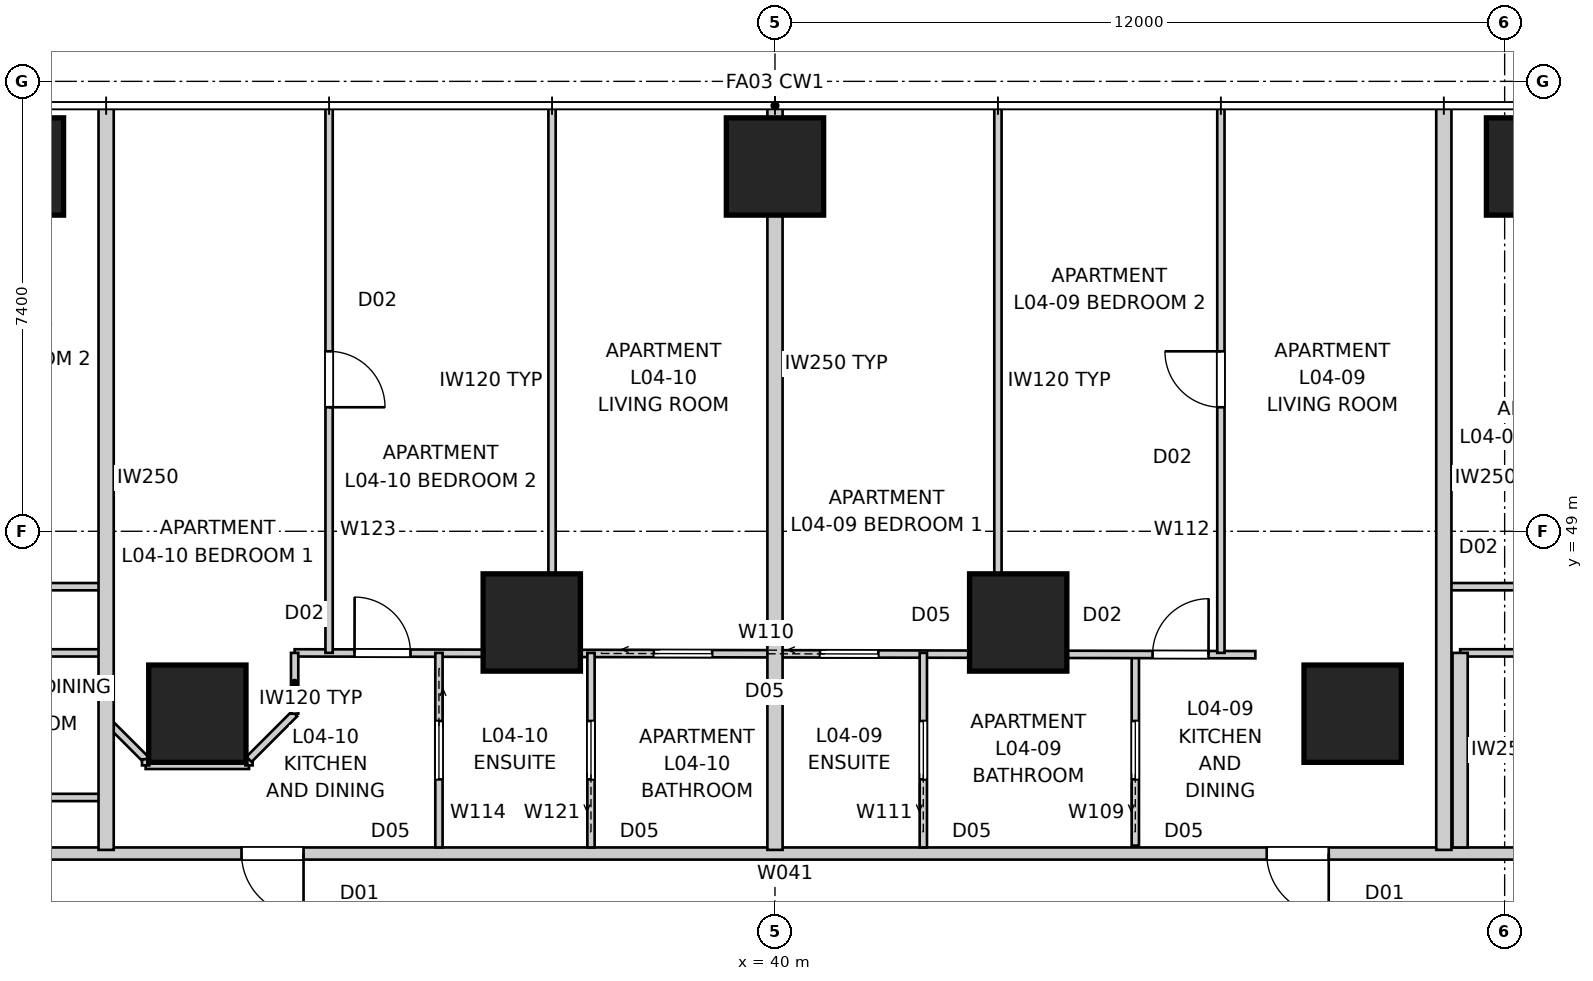
"""IFC4 building model, lengths in metres.
Left out: names, types, materials, properties, quantities, classifications, styles, units other than length and angle.
Written with IfcOpenShell. Run it as: python <this file> out.ifc"""

import sys

from ifc_helpers import new_model, si_unit, direction, frame, frame_2d, origin, origin_2d, place, context, subcontext, project, spatial, rectangle, extrude, element, fill, save


model = new_model("IFC4")
c1 = context("Model", 3, precision=1e-05, world=origin(), true_north=direction((0.0, 1.0)))
c2 = subcontext(c1, "Body", "Model", "MODEL_VIEW")
j1 = project(units=[si_unit("LENGTHUNIT", "METRE"), si_unit("PLANEANGLEUNIT", "RADIAN")], contexts=[c1])
p1 = place(None, origin())
s1 = spatial("IfcSite", under=j1, at=p1, CompositionType="ELEMENT")
p2 = place(p1, origin())
s2 = spatial("IfcBuilding", under=s1, at=p2, CompositionType="ELEMENT")
p3 = place(p2, frame((0.0, 0.0, 18.4)))
s3 = spatial("IfcBuildingStorey", under=s2, at=p3, CompositionType="ELEMENT", Elevation=18.4)
for number, where, z_axis, x_axis in (
    (1, (52.5, 55.0, 0.0), (0.0, 0.0, 1.0), (1.0, 0.0, 0.0)),
    (2, (40.0, 55.0, 0.0), (0.0, 0.0, 1.0), (1.0, 0.0, 0.0)),
    (3, (27.5, 55.0, 0.0), (0.0, 0.0, 1.0), (1.0, 0.0, 0.0)),
    (4, (49.5, 46.0, 0.0), (0.0, 0.0, 1.0), (1.0, 0.0, 0.0)),
    (5, (44.0, 47.5, 0.0), (0.0, 0.0, 1.0), (1.0, 0.0, 0.0)),
    (6, (36.0, 47.5, 0.0), (0.0, 0.0, 1.0), (1.0, 0.0, 0.0)),
    (7, (30.5, 46.0, 0.0), (0.0, 0.0, 1.0), (1.0, 0.0, 0.0)),
):
    element("IfcColumn", number, at=place(p3, frame(where, z_axis=z_axis, x_axis=x_axis)), inside=s3, PredefinedType="COLUMN", context=c2, shape_type="SweptSolid", body=[
        extrude(rectangle(XDim=1.6, YDim=1.6, at=origin_2d()), origin(), (0.0, 0.0, 1.0), 3.4),
    ])
p4 = place(p3, frame((54.5, 43.7, 0.0), z_axis=(0.0, 0.0, 1.0), x_axis=(-1.0, 0.0, 0.0)))
e8 = element("IfcWall", 8, at=p4, inside=s3, PredefinedType="PARTITIONING", context=c2, shape_type="SweptSolid", body=[
    extrude(rectangle(XDim=29.0, YDim=0.2, at=frame_2d((14.5, 0.0))), origin(), (0.0, 0.0, 1.0), 3.25),
])
p5 = place(p4, frame((22.253, 0.0, 0.0)))
e9 = element("IfcOpeningElement", 9, at=p5, cuts=e8, PredefinedType="OPENING", context=c2, shape_type="SweptSolid", body=[
    extrude(rectangle(XDim=1.02, YDim=2.34, at=frame_2d((0.51, 1.17))), frame((0.0, 0.11, 0.0), z_axis=(0.0, -1.0, 0.0), x_axis=(1.0, 0.0, 0.0)), (0.0, 0.0, 1.0), 0.22),
])
p6 = place(p4, frame((5.393, 0.0, 0.0)))
e10 = element("IfcOpeningElement", 10, at=p6, cuts=e8, PredefinedType="OPENING", context=c2, shape_type="SweptSolid", body=[
    extrude(rectangle(XDim=1.02, YDim=2.34, at=frame_2d((0.51, 1.17))), frame((0.0, 0.11, 0.0), z_axis=(0.0, -1.0, 0.0), x_axis=(1.0, 0.0, 0.0)), (0.0, 0.0, 1.0), 0.22),
])
p7 = place(p4, frame((1.281, 0.0, 0.0)))
e11 = element("IfcOpeningElement", 11, at=p7, cuts=e8, PredefinedType="OPENING", context=c2, shape_type="SweptSolid", body=[
    extrude(rectangle(XDim=1.02, YDim=2.34, at=frame_2d((0.51, 1.17))), frame((0.0, 0.11, 0.0), z_axis=(0.0, -1.0, 0.0), x_axis=(1.0, 0.0, 0.0)), (0.0, 0.0, 1.0), 0.22),
])
for number, where, z_axis, x_axis in (
    (12, (51.0, 56.0, 0.0), (0.0, 0.0, 1.0), (0.0, -1.0, 0.0)),
    (13, (29.0, 56.0, 0.0), (0.0, 0.0, 1.0), (0.0, -1.0, 0.0)),
):
    element("IfcWall", number, at=place(p3, frame(where, z_axis=z_axis, x_axis=x_axis)), inside=s3, PredefinedType="PARTITIONING", context=c2, shape_type="SweptSolid", body=[
        extrude(rectangle(XDim=12.24, YDim=0.25, at=frame_2d((6.12, 0.0))), origin(), (0.0, 0.0, 1.0), 3.25),
    ])
p8 = place(p3, frame((40.0, 56.0, 0.0), z_axis=(0.0, 0.0, 1.0), x_axis=(0.0, -1.0, 0.0)))
e14 = element("IfcWall", 14, at=p8, inside=s3, PredefinedType="PARTITIONING", context=c2, shape_type="SweptSolid", body=[
    extrude(rectangle(XDim=8.5, YDim=0.25, at=frame_2d((4.25, 0.0))), origin(), (0.0, 0.0, 1.0), 3.25),
])
p9 = place(p3, frame((40.0, 47.5, 0.0), z_axis=(0.0, 0.0, 1.0), x_axis=(0.0, -1.0, 0.0)))
e15 = element("IfcWall", 15, at=p9, inside=s3, PredefinedType="PARTITIONING", context=c2, shape_type="SweptSolid", body=[
    extrude(rectangle(XDim=3.74, YDim=0.25, at=frame_2d((1.87, 0.0))), origin(), (0.0, 0.0, 1.0), 2.795),
])
p10 = place(p3, frame((51.268, 47.0, 0.0), z_axis=(0.0, 0.0, 1.0), x_axis=(1.0, 0.0, 0.0)))
e16 = element("IfcWall", 16, at=p10, inside=s3, PredefinedType="PARTITIONING", context=c2, shape_type="SweptSolid", body=[
    extrude(rectangle(XDim=5.732, YDim=0.12, at=frame_2d((2.866, 0.0))), origin(), (0.0, 0.0, 1.0), 3.25),
])
p11 = place(p10, frame((2.406, 0.0, 0.0)))
e17 = element("IfcOpeningElement", 17, at=p11, cuts=e16, PredefinedType="OPENING", context=c2, shape_type="SweptSolid", body=[
    extrude(rectangle(XDim=0.92, YDim=2.34, at=frame_2d((0.46, 1.17))), frame((0.0, 0.07, 0.0), z_axis=(0.0, -1.0, 0.0), x_axis=(1.0, 0.0, 0.0)), (0.0, 0.0, 1.0), 0.14),
])
p12 = place(p3, frame((51.268, 43.8, 0.0), z_axis=(0.0, 0.0, 1.0), x_axis=(0.0, 1.0, 0.0)))
e18 = element("IfcWall", 18, at=p12, inside=s3, PredefinedType="PARTITIONING", context=c2, shape_type="SweptSolid", body=[
    extrude(rectangle(XDim=3.2, YDim=0.25, at=frame_2d((1.6, 0.0))), origin(), (0.0, 0.0, 1.0), 3.25),
])
p13 = place(p3, frame((51.0, 48.089, 0.0), z_axis=(0.0, 0.0, 1.0), x_axis=(1.0, 0.0, 0.0)))
e19 = element("IfcWall", 19, at=p13, inside=s3, PredefinedType="PARTITIONING", context=c2, shape_type="SweptSolid", body=[
    extrude(rectangle(XDim=14.96, YDim=0.12, at=frame_2d((7.48, 0.0))), origin(), (0.0, 0.0, 1.0), 3.25),
])
p14 = place(p13, frame((6.298, 0.0, 0.0)))
e20 = element("IfcOpeningElement", 20, at=p14, cuts=e19, PredefinedType="OPENING", context=c2, shape_type="SweptSolid", body=[
    extrude(rectangle(XDim=0.92, YDim=2.34, at=frame_2d((0.46, 1.17))), frame((0.0, 0.07, 0.0), z_axis=(0.0, -1.0, 0.0), x_axis=(1.0, 0.0, 0.0)), (0.0, 0.0, 1.0), 0.14),
])
p15 = place(p13, frame((1.398, 0.0, 0.0)))
e21 = element("IfcOpeningElement", 21, at=p15, cuts=e19, PredefinedType="OPENING", context=c2, shape_type="SweptSolid", body=[
    extrude(rectangle(XDim=0.92, YDim=2.34, at=frame_2d((0.46, 1.17))), frame((0.0, 0.07, 0.0), z_axis=(0.0, -1.0, 0.0), x_axis=(1.0, 0.0, 0.0)), (0.0, 0.0, 1.0), 0.14),
])
p16 = place(p3, frame((45.926, 43.83, 0.0), z_axis=(0.0, 0.0, 1.0), x_axis=(0.0, 1.0, 0.0)))
e22 = element("IfcWall", 22, at=p16, inside=s3, PredefinedType="PARTITIONING", context=c2, shape_type="SweptSolid", body=[
    extrude(rectangle(XDim=3.14, YDim=0.12, at=frame_2d((1.57, 0.0))), origin(), (0.0, 0.0, 1.0), 3.25),
])
p17 = place(p16, frame((1.09, 0.0, 0.0)))
e23 = element("IfcOpeningElement", 23, at=p17, cuts=e22, PredefinedType="OPENING", context=c2, shape_type="SweptSolid", body=[
    extrude(rectangle(XDim=0.96, YDim=2.1, at=frame_2d((0.48, 1.05))), frame((0.0, 0.07, 0.0), z_axis=(0.0, -1.0, 0.0), x_axis=(1.0, 0.0, 0.0)), (0.0, 0.0, 1.0), 0.14),
])
p18 = place(p3, frame((32.1, 47.0, 0.0), z_axis=(0.0, 0.0, 1.0), x_axis=(0.999998193842, -0.001900608472, 0.0)))
e24 = element("IfcWall", 24, at=p18, inside=s3, PredefinedType="PARTITIONING", context=c2, shape_type="SweptSolid", body=[
    extrude(rectangle(XDim=15.8, YDim=0.12, at=frame_2d((7.9, 0.0))), origin(), (0.0, 0.0, 1.0), 2.55),
])
p19 = place(p18, frame((0.985, 0.0, 0.0)))
e25 = element("IfcOpeningElement", 25, at=p19, cuts=e24, PredefinedType="OPENING", context=c2, shape_type="SweptSolid", body=[
    extrude(rectangle(XDim=0.92, YDim=2.34, at=frame_2d((0.46, 1.17))), frame((0.0, 0.07, 0.0), z_axis=(0.0, -1.0, 0.0), x_axis=(1.0, 0.0, 0.0)), (0.0, 0.0, 1.0), 0.14),
])
p20 = place(p18, frame((14.11, 0.0, 0.0)))
e26 = element("IfcOpeningElement", 26, at=p20, cuts=e24, PredefinedType="OPENING", context=c2, shape_type="SweptSolid", body=[
    extrude(rectangle(XDim=0.92, YDim=2.34, at=frame_2d((0.46, 1.17))), frame((0.0, 0.07, 0.0), z_axis=(0.0, -1.0, 0.0), x_axis=(1.0, 0.0, 0.0)), (0.0, 0.0, 1.0), 0.14),
])
p21 = place(p18, frame((5.907, 0.0, 0.0)))
e27 = element("IfcOpeningElement", 27, at=p21, cuts=e24, PredefinedType="OPENING", context=c2, shape_type="SweptSolid", body=[
    extrude(rectangle(XDim=0.96, YDim=2.1, at=frame_2d((0.48, 1.05))), frame((0.0, 0.07, 0.0), z_axis=(0.0, -1.0, 0.0), x_axis=(1.0, 0.0, 0.0)), (0.0, 0.0, 1.0), 0.14),
])
p22 = place(p18, frame((8.64, 0.0, 0.0)))
e28 = element("IfcOpeningElement", 28, at=p22, cuts=e24, PredefinedType="OPENING", context=c2, shape_type="SweptSolid", body=[
    extrude(rectangle(XDim=0.96, YDim=2.1, at=frame_2d((0.48, 1.05))), frame((0.0, 0.07, 0.0), z_axis=(0.0, -1.0, 0.0), x_axis=(1.0, 0.0, 0.0)), (0.0, 0.0, 1.0), 0.14),
])
p23 = place(p3, frame((42.44, 43.8, 0.0), z_axis=(0.0, 0.0, 1.0), x_axis=(0.0, 1.0, 0.0)))
e29 = element("IfcWall", 29, at=p23, inside=s3, PredefinedType="PARTITIONING", context=c2, shape_type="SweptSolid", body=[
    extrude(rectangle(XDim=3.2, YDim=0.12, at=frame_2d((1.6, 0.0))), origin(), (0.0, 0.0, 1.0), 3.25),
])
p24 = place(p23, frame((1.12, 0.0, 0.0)))
e30 = element("IfcOpeningElement", 30, at=p24, cuts=e29, PredefinedType="OPENING", context=c2, shape_type="SweptSolid", body=[
    extrude(rectangle(XDim=0.96, YDim=2.1, at=frame_2d((0.48, 1.05))), frame((0.0, 0.07, 0.0), z_axis=(0.0, -1.0, 0.0), x_axis=(1.0, 0.0, 0.0)), (0.0, 0.0, 1.0), 0.14),
])
p25 = place(p3, frame((47.333, 47.0, 0.0), z_axis=(0.0, 0.0, 1.0), x_axis=(0.0, 1.0, 0.0)))
e31 = element("IfcWall", 31, at=p25, inside=s3, PredefinedType="PARTITIONING", context=c2, shape_type="SweptSolid", body=[
    extrude(rectangle(XDim=8.96, YDim=0.12, at=frame_2d((4.48, 0.0))), origin(), (0.0, 0.0, 1.0), 3.25),
])
p26 = place(p25, frame((4.04, 0.0, 0.0)))
e32 = element("IfcOpeningElement", 32, at=p26, cuts=e31, PredefinedType="OPENING", context=c2, shape_type="SweptSolid", body=[
    extrude(rectangle(XDim=0.92, YDim=2.34, at=frame_2d((0.46, 1.17))), frame((0.0, 0.07, 0.0), z_axis=(0.0, -1.0, 0.0), x_axis=(1.0, 0.0, 0.0)), (0.0, 0.0, 1.0), 0.14),
])
p27 = place(p3, frame((43.667, 55.96, 0.0), z_axis=(0.0, 0.0, 1.0), x_axis=(0.0, -1.0, 0.0)))
e33 = element("IfcWall", 33, at=p27, inside=s3, PredefinedType="PARTITIONING", context=c2, shape_type="SweptSolid", body=[
    extrude(rectangle(XDim=8.96, YDim=0.12, at=frame_2d((4.48, 0.0))), origin(), (0.0, 0.0, 1.0), 3.25),
])
p28 = place(p3, frame((34.473, 47.0, 0.0), z_axis=(0.0, 0.0, 1.0), x_axis=(0.0, -1.0, 0.0)))
e34 = element("IfcWall", 34, at=p28, inside=s3, PredefinedType="PARTITIONING", context=c2, shape_type="SweptSolid", body=[
    extrude(rectangle(XDim=3.2, YDim=0.12, at=frame_2d((1.6, 0.0))), origin(), (0.0, 0.0, 1.0), 3.25),
])
p29 = place(p28, frame((1.12, 0.0, 0.0)))
e35 = element("IfcOpeningElement", 35, at=p29, cuts=e34, PredefinedType="OPENING", context=c2, shape_type="SweptSolid", body=[
    extrude(rectangle(XDim=0.96, YDim=2.1, at=frame_2d((0.48, 1.05))), frame((0.0, 0.07, 0.0), z_axis=(0.0, -1.0, 0.0), x_axis=(1.0, 0.0, 0.0)), (0.0, 0.0, 1.0), 0.14),
])
p30 = place(p3, frame((29.0, 45.9, 0.0), z_axis=(0.0, 0.0, 1.0), x_axis=(0.707106781187, -0.707106781187, 0.0)))
e36 = element("IfcWall", 36, at=p30, inside=s3, PredefinedType="PARTITIONING", context=c2, shape_type="SweptSolid", body=[
    extrude(rectangle(XDim=0.919, YDim=0.12, at=frame_2d((0.459, 0.0))), origin(), (0.0, 0.0, 1.0), 3.25),
])
p31 = place(p3, frame((29.65, 45.15, 0.0), z_axis=(0.0, 0.0, 1.0), x_axis=(1.0, 0.0, 0.0)))
e37 = element("IfcWall", 37, at=p31, inside=s3, PredefinedType="PARTITIONING", context=c2, shape_type="SweptSolid", body=[
    extrude(rectangle(XDim=1.7, YDim=0.12, at=frame_2d((0.85, 0.0))), origin(), (0.0, 0.0, 1.0), 3.25),
])
p32 = place(p3, frame((31.35, 45.25, 0.0), z_axis=(0.0, 0.0, 1.0), x_axis=(0.707106781187, 0.707106781187, 0.0)))
e38 = element("IfcWall", 38, at=p32, inside=s3, PredefinedType="PARTITIONING", context=c2, shape_type="SweptSolid", body=[
    extrude(rectangle(XDim=1.061, YDim=0.12, at=frame_2d((0.53, 0.0))), origin(), (0.0, 0.0, 1.0), 3.25),
])
p33 = place(p3, frame((32.1, 46.0, 0.0), z_axis=(0.0, 0.0, 1.0), x_axis=(0.0, 1.0, 0.0)))
e39 = element("IfcWall", 39, at=p33, inside=s3, PredefinedType="PARTITIONING", context=c2, shape_type="SweptSolid", body=[
    extrude(rectangle(XDim=1.0, YDim=0.12, at=frame_2d((0.5, 0.0))), origin(), (0.0, 0.0, 1.0), 3.25),
])
p34 = place(p3, frame((36.974, 43.8, 0.0), z_axis=(0.0, 0.0, 1.0), x_axis=(0.0, 1.0, 0.0)))
e40 = element("IfcWall", 40, at=p34, inside=s3, PredefinedType="PARTITIONING", context=c2, shape_type="SweptSolid", body=[
    extrude(rectangle(XDim=3.2, YDim=0.12, at=frame_2d((1.6, 0.0))), origin(), (0.0, 0.0, 1.0), 3.25),
])
p35 = place(p34, frame((1.12, 0.0, 0.0)))
e41 = element("IfcOpeningElement", 41, at=p35, cuts=e40, PredefinedType="OPENING", context=c2, shape_type="SweptSolid", body=[
    extrude(rectangle(XDim=0.96, YDim=2.1, at=frame_2d((0.48, 1.05))), frame((0.0, 0.07, 0.0), z_axis=(0.0, -1.0, 0.0), x_axis=(1.0, 0.0, 0.0)), (0.0, 0.0, 1.0), 0.14),
])
p36 = place(p3, frame((36.333, 47.0, 0.0), z_axis=(0.0, 0.0, 1.0), x_axis=(0.0, 1.0, 0.0)))
e42 = element("IfcWall", 42, at=p36, inside=s3, PredefinedType="PARTITIONING", context=c2, shape_type="SweptSolid", body=[
    extrude(rectangle(XDim=8.96, YDim=0.12, at=frame_2d((4.48, 0.0))), origin(), (0.0, 0.0, 1.0), 3.25),
])
p37 = place(p3, frame((32.667, 55.96, 0.0), z_axis=(0.0, 0.0, 1.0), x_axis=(0.0, -1.0, 0.0)))
e43 = element("IfcWall", 43, at=p37, inside=s3, PredefinedType="PARTITIONING", context=c2, shape_type="SweptSolid", body=[
    extrude(rectangle(XDim=8.96, YDim=0.12, at=frame_2d((4.48, 0.0))), origin(), (0.0, 0.0, 1.0), 3.25),
])
p38 = place(p37, frame((4.0, 0.0, 0.0)))
e44 = element("IfcOpeningElement", 44, at=p38, cuts=e43, PredefinedType="OPENING", context=c2, shape_type="SweptSolid", body=[
    extrude(rectangle(XDim=0.92, YDim=2.34, at=frame_2d((0.46, 1.17))), frame((0.0, 0.07, 0.0), z_axis=(0.0, -1.0, 0.0), x_axis=(1.0, 0.0, 0.0)), (0.0, 0.0, 1.0), 0.14),
])
p39 = place(p3, frame((23.0, 44.622, 0.0), z_axis=(0.0, 0.0, 1.0), x_axis=(1.0, 0.0, 0.0)))
e45 = element("IfcWall", 45, at=p39, inside=s3, PredefinedType="PARTITIONING", context=c2, shape_type="SweptSolid", body=[
    extrude(rectangle(XDim=6.0, YDim=0.12, at=frame_2d((3.0, 0.0))), origin(), (0.0, 0.0, 1.0), 2.638),
])
p40 = place(p39, frame((1.47, 0.0, 0.0)))
e46 = element("IfcOpeningElement", 46, at=p40, cuts=e45, PredefinedType="OPENING", context=c2, shape_type="SweptSolid", body=[
    extrude(rectangle(XDim=0.96, YDim=2.1, at=frame_2d((0.48, 1.05))), frame((0.0, 0.07, 0.0), z_axis=(0.0, -1.0, 0.0), x_axis=(1.0, 0.0, 0.0)), (0.0, 0.0, 1.0), 0.14),
])
p41 = place(p3, frame((23.0, 47.0, 0.0), z_axis=(0.0, 0.0, 1.0), x_axis=(1.0, 0.0, 0.0)))
e47 = element("IfcWall", 47, at=p41, inside=s3, PredefinedType="PARTITIONING", context=c2, shape_type="SweptSolid", body=[
    extrude(rectangle(XDim=6.0, YDim=0.12, at=frame_2d((3.0, 0.0))), origin(), (0.0, 0.0, 1.0), 3.25),
])
p42 = place(p3, frame((14.04, 48.089, 0.0), z_axis=(0.0, 0.0, 1.0), x_axis=(1.0, 0.0, 0.0)))
e48 = element("IfcWall", 48, at=p42, inside=s3, PredefinedType="PARTITIONING", context=c2, shape_type="SweptSolid", body=[
    extrude(rectangle(XDim=14.96, YDim=0.12, at=frame_2d((7.48, 0.0))), origin(), (0.0, 0.0, 1.0), 3.25),
])
p43 = place(p42, frame((7.742, 0.0, 0.0)))
e49 = element("IfcOpeningElement", 49, at=p43, cuts=e48, PredefinedType="OPENING", context=c2, shape_type="SweptSolid", body=[
    extrude(rectangle(XDim=0.92, YDim=2.34, at=frame_2d((0.46, 1.17))), frame((0.0, 0.07, 0.0), z_axis=(0.0, -1.0, 0.0), x_axis=(1.0, 0.0, 0.0)), (0.0, 0.0, 1.0), 0.14),
])
p44 = place(p42, frame((12.642, 0.0, 0.0)))
e50 = element("IfcOpeningElement", 50, at=p44, cuts=e48, PredefinedType="OPENING", context=c2, shape_type="SweptSolid", body=[
    extrude(rectangle(XDim=0.92, YDim=2.34, at=frame_2d((0.46, 1.17))), frame((0.0, 0.07, 0.0), z_axis=(0.0, -1.0, 0.0), x_axis=(1.0, 0.0, 0.0)), (0.0, 0.0, 1.0), 0.14),
])
for number, where, z_axis, x_axis in (
    (51, (29.65, 45.15, 0.0), (0.0, 0.0, 1.0), (0.0, 1.0, 0.0)),
    (52, (31.35, 45.15, 0.0), (0.0, 0.0, 1.0), (0.0, 1.0, 0.0)),
):
    element("IfcWall", number, at=place(p3, frame(where, z_axis=z_axis, x_axis=x_axis)), inside=s3, PredefinedType="PARTITIONING", context=c2, shape_type="SweptSolid", body=[
        extrude(rectangle(XDim=0.1, YDim=0.12, at=frame_2d((0.05, 0.0))), origin(), (0.0, 0.0, 1.0), 3.25),
    ])
p45 = place(p5, origin())
e53 = element("IfcDoor", 53, at=p45, inside=s3, OperationType="SINGLE_SWING_LEFT", PredefinedType="DOOR", context=c2, shape_type="SweptSolid", body=[
    extrude(rectangle(XDim=1.02, YDim=2.34, at=frame_2d((0.51, 1.17))), frame((0.0, 0.025, 0.0), z_axis=(0.0, -1.0, 0.0), x_axis=(1.0, 0.0, 0.0)), (0.0, 0.0, 1.0), 0.05),
])
fill(e9, e53)
p46 = place(p6, origin())
e54 = element("IfcDoor", 54, at=p46, inside=s3, OperationType="SINGLE_SWING_LEFT", PredefinedType="DOOR", context=c2, shape_type="SweptSolid", body=[
    extrude(rectangle(XDim=1.02, YDim=2.34, at=frame_2d((0.51, 1.17))), frame((0.0, 0.025, 0.0), z_axis=(0.0, -1.0, 0.0), x_axis=(1.0, 0.0, 0.0)), (0.0, 0.0, 1.0), 0.05),
])
fill(e10, e54)
p47 = place(p29, origin())
e55 = element("IfcDoor", 55, at=p47, inside=s3, OperationType="SLIDING_TO_LEFT", PredefinedType="DOOR", context=c2, shape_type="SweptSolid", body=[
    extrude(rectangle(XDim=0.96, YDim=2.1, at=frame_2d((0.48, 1.05))), frame((0.0, 0.025, 0.0), z_axis=(0.0, -1.0, 0.0), x_axis=(1.0, 0.0, 0.0)), (0.0, 0.0, 1.0), 0.05),
])
fill(e35, e55)
p48 = place(p19, origin())
e56 = element("IfcDoor", 56, at=p48, inside=s3, OperationType="SINGLE_SWING_LEFT", PredefinedType="DOOR", context=c2, shape_type="SweptSolid", body=[
    extrude(rectangle(XDim=0.92, YDim=2.34, at=frame_2d((0.46, 1.17))), frame((0.0, 0.025, 0.0), z_axis=(0.0, -1.0, 0.0), x_axis=(1.0, 0.0, 0.0)), (0.0, 0.0, 1.0), 0.05),
])
fill(e25, e56)
p49 = place(p17, origin())
e57 = element("IfcDoor", 57, at=p49, inside=s3, OperationType="SLIDING_TO_LEFT", PredefinedType="DOOR", context=c2, shape_type="SweptSolid", body=[
    extrude(rectangle(XDim=0.96, YDim=2.1, at=frame_2d((0.48, 1.05))), frame((0.0, 0.025, 0.0), z_axis=(0.0, -1.0, 0.0), x_axis=(1.0, 0.0, 0.0)), (0.0, 0.0, 1.0), 0.05),
])
fill(e23, e57)
p50 = place(p20, origin())
e58 = element("IfcDoor", 58, at=p50, inside=s3, OperationType="SINGLE_SWING_RIGHT", PredefinedType="DOOR", context=c2, shape_type="SweptSolid", body=[
    extrude(rectangle(XDim=0.92, YDim=2.34, at=frame_2d((0.46, 1.17))), frame((0.0, 0.025, 0.0), z_axis=(0.0, -1.0, 0.0), x_axis=(1.0, 0.0, 0.0)), (0.0, 0.0, 1.0), 0.05),
])
fill(e26, e58)
p51 = place(p35, origin())
e59 = element("IfcDoor", 59, at=p51, inside=s3, OperationType="SLIDING_TO_LEFT", PredefinedType="DOOR", context=c2, shape_type="SweptSolid", body=[
    extrude(rectangle(XDim=0.96, YDim=2.1, at=frame_2d((0.48, 1.05))), frame((0.0, 0.025, 0.0), z_axis=(0.0, -1.0, 0.0), x_axis=(1.0, 0.0, 0.0)), (0.0, 0.0, 1.0), 0.05),
])
fill(e41, e59)
p52 = place(p24, origin())
e60 = element("IfcDoor", 60, at=p52, inside=s3, OperationType="SLIDING_TO_LEFT", PredefinedType="DOOR", context=c2, shape_type="SweptSolid", body=[
    extrude(rectangle(XDim=0.96, YDim=2.1, at=frame_2d((0.48, 1.05))), frame((0.0, 0.025, 0.0), z_axis=(0.0, -1.0, 0.0), x_axis=(1.0, 0.0, 0.0)), (0.0, 0.0, 1.0), 0.05),
])
fill(e30, e60)
p53 = place(p21, origin())
e61 = element("IfcDoor", 61, at=p53, inside=s3, OperationType="SLIDING_TO_LEFT", PredefinedType="DOOR", context=c2, shape_type="SweptSolid", body=[
    extrude(rectangle(XDim=0.96, YDim=2.1, at=frame_2d((0.48, 1.05))), frame((0.0, 0.025, 0.0), z_axis=(0.0, -1.0, 0.0), x_axis=(1.0, 0.0, 0.0)), (0.0, 0.0, 1.0), 0.05),
])
fill(e27, e61)
p54 = place(p22, origin())
e62 = element("IfcDoor", 62, at=p54, inside=s3, OperationType="SLIDING_TO_LEFT", PredefinedType="DOOR", context=c2, shape_type="SweptSolid", body=[
    extrude(rectangle(XDim=0.96, YDim=2.1, at=frame_2d((0.48, 1.05))), frame((0.0, 0.025, 0.0), z_axis=(0.0, -1.0, 0.0), x_axis=(1.0, 0.0, 0.0)), (0.0, 0.0, 1.0), 0.05),
])
fill(e28, e62)
p55 = place(p38, origin())
e63 = element("IfcDoor", 63, at=p55, inside=s3, OperationType="SINGLE_SWING_RIGHT", PredefinedType="DOOR", context=c2, shape_type="SweptSolid", body=[
    extrude(rectangle(XDim=0.92, YDim=2.34, at=frame_2d((0.46, 1.17))), frame((0.0, 0.025, 0.0), z_axis=(0.0, -1.0, 0.0), x_axis=(1.0, 0.0, 0.0)), (0.0, 0.0, 1.0), 0.05),
])
fill(e44, e63)
p56 = place(p26, origin())
e64 = element("IfcDoor", 64, at=p56, inside=s3, OperationType="SINGLE_SWING_RIGHT", PredefinedType="DOOR", context=c2, shape_type="SweptSolid", body=[
    extrude(rectangle(XDim=0.92, YDim=2.34, at=frame_2d((0.46, 1.17))), frame((0.0, 0.025, 0.0), z_axis=(0.0, -1.0, 0.0), x_axis=(1.0, 0.0, 0.0)), (0.0, 0.0, 1.0), 0.05),
])
fill(e32, e64)
save(model, sys.argv[1])
